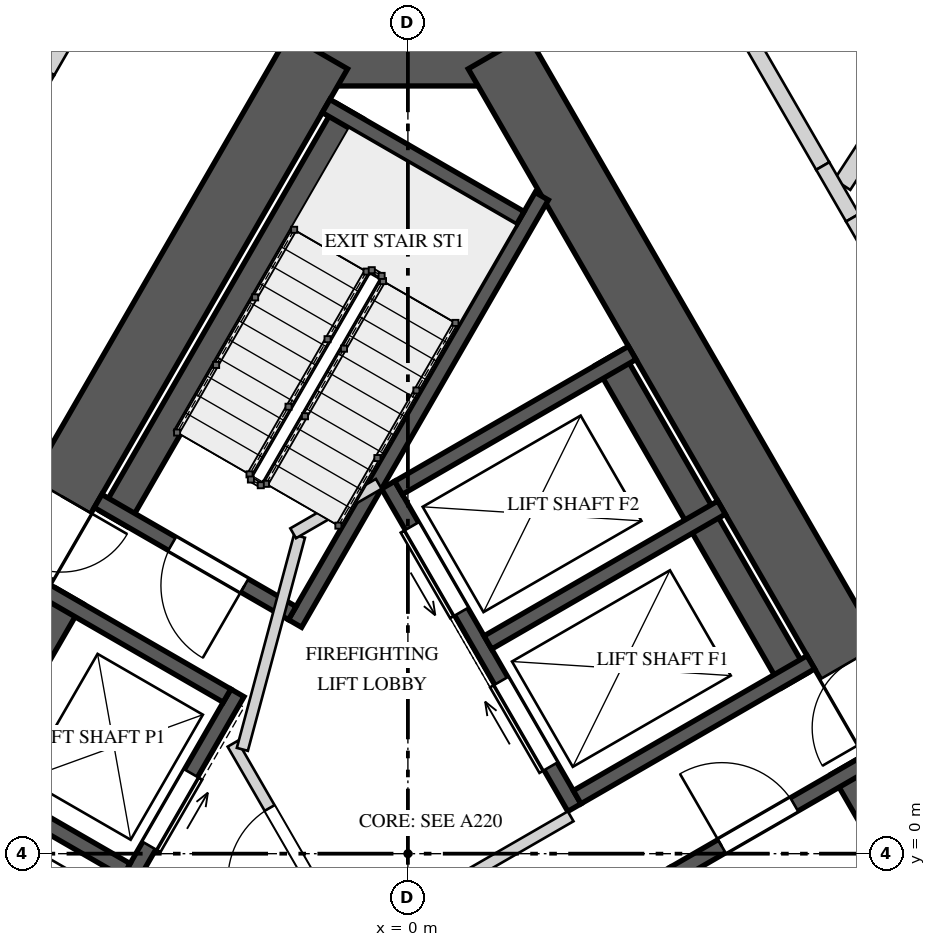
"""IFC4 building model, lengths in metres.
Left out: names, types, materials, properties, quantities, classifications, styles, units other than length and angle.
Written with IfcOpenShell. Run it as: python <this file> out.ifc"""

import sys

from ifc_helpers import new_model, si_unit, direction, frame, frame_2d, origin, place, context, subcontext, project, spatial, rectangle, extrude, element, fill, save


model = new_model("IFC4")
c1 = context("Model", 3, precision=1e-05, world=origin(), true_north=direction((0.0, 1.0)))
c2 = subcontext(c1, "Body", "Model", "MODEL_VIEW")
j1 = project(units=[si_unit("LENGTHUNIT", "METRE"), si_unit("PLANEANGLEUNIT", "RADIAN")], contexts=[c1])
p1 = place(None, origin())
s1 = spatial("IfcSite", under=j1, at=p1, CompositionType="ELEMENT")
p2 = place(p1, origin())
s2 = spatial("IfcBuilding", under=s1, at=p2, CompositionType="ELEMENT")
p3 = place(p2, frame((0.0, 0.0, 133.6)))
s3 = spatial("IfcBuildingStorey", under=s2, at=p3, CompositionType="ELEMENT", Elevation=133.6)
p4 = place(p3, frame((1.443, 10.55, 0.0), z_axis=(0.0, 0.0, 1.0), x_axis=(-1.0, 0.0, 0.0)))
e1 = element("IfcWall", 1, at=p4, inside=s3, PredefinedType="SHEAR", context=c2, shape_type="SweptSolid", body=[
    extrude(rectangle(XDim=2.887, YDim=0.9, at=frame_2d((1.443, 0.0))), origin(), (0.0, 0.0, 1.0), 4.0),
])
p5 = place(p3, frame((-1.184, 10.55, 0.0), z_axis=(0.0, 0.0, 1.0), x_axis=(-0.500004814304, -0.866022624227, 0.0)))
e2 = element("IfcWall", 2, at=p5, inside=s3, PredefinedType="SHEAR", context=c2, shape_type="SweptSolid", body=[
    extrude(rectangle(XDim=17.09, YDim=0.9, at=frame_2d((8.545, 0.0))), origin(), (0.0, 0.0, 1.0), 4.0),
])
p6 = place(p5, frame((6.75, 0.0, 0.0)))
e3 = element("IfcOpeningElement", 3, at=p6, cuts=e2, PredefinedType="OPENING", context=c2, shape_type="SweptSolid", body=[
    extrude(rectangle(XDim=1.0, YDim=2.4, at=frame_2d((0.5, 1.2))), frame((0.0, 0.46, 0.0), z_axis=(0.0, -1.0, 0.0), x_axis=(1.0, 0.0, 0.0)), (0.0, 0.0, 1.0), 0.92),
])
p7 = place(p5, frame((14.678, 0.0, 0.0)))
e4 = element("IfcOpeningElement", 4, at=p7, cuts=e2, PredefinedType="OPENING", context=c2, shape_type="SweptSolid", body=[
    extrude(rectangle(XDim=0.8, YDim=2.1, at=frame_2d((0.4, 1.05))), frame((0.0, 0.46, 0.0), z_axis=(0.0, -1.0, 0.0), x_axis=(1.0, 0.0, 0.0)), (0.0, 0.0, 1.0), 0.92),
])
p8 = place(p3, frame((9.729, -4.25, 0.0), z_axis=(0.0, 0.0, 1.0), x_axis=(-0.500004814304, 0.866022624227, 0.0)))
e5 = element("IfcWall", 5, at=p8, inside=s3, PredefinedType="SHEAR", context=c2, shape_type="SweptSolid", body=[
    extrude(rectangle(XDim=17.09, YDim=0.9, at=frame_2d((8.545, 0.0))), origin(), (0.0, 0.0, 1.0), 4.0),
])
p9 = place(p8, frame((6.82, 0.0, 0.0)))
e6 = element("IfcOpeningElement", 6, at=p9, cuts=e5, PredefinedType="OPENING", context=c2, shape_type="SweptSolid", body=[
    extrude(rectangle(XDim=1.0, YDim=2.4, at=frame_2d((0.5, 1.2))), frame((0.0, 0.46, 0.0), z_axis=(0.0, -1.0, 0.0), x_axis=(1.0, 0.0, 0.0)), (0.0, 0.0, 1.0), 0.92),
])
p10 = place(p3, frame((-0.766, 9.772, 0.0), z_axis=(0.0, 0.0, 1.0), x_axis=(-0.500009909098, -0.866019682689, 0.0)))
e7 = element("IfcWall", 7, at=p10, inside=s3, PredefinedType="SOLIDWALL", context=c2, shape_type="SweptSolid", body=[
    extrude(rectangle(XDim=6.2, YDim=0.4, at=frame_2d((3.1, 0.0))), origin(), (0.0, 0.0, 1.0), 3.65),
])
p11 = place(p3, frame((1.761, 8.65, 0.0), z_axis=(0.0, 0.0, 1.0), x_axis=(-0.500010023241, -0.866019616786, 0.0)))
e8 = element("IfcWall", 8, at=p11, inside=s3, PredefinedType="SOLIDWALL", context=c2, shape_type="SweptSolid", body=[
    extrude(rectangle(XDim=6.491, YDim=0.2, at=frame_2d((3.246, 0.0))), origin(), (0.0, 0.0, 1.0), 3.65),
])
p12 = place(p3, frame((1.479, 8.361, 0.0), z_axis=(0.0, 0.0, 1.0), x_axis=(-0.866003658127, 0.500037662692, 0.0)))
e9 = element("IfcWall", 9, at=p12, inside=s3, PredefinedType="SOLIDWALL", context=c2, shape_type="SweptSolid", body=[
    extrude(rectangle(XDim=2.95, YDim=0.2, at=frame_2d((1.475, 0.0))), origin(), (0.0, 0.0, 1.0), 3.65),
])
p13 = place(p3, frame((-1.521, 3.165, 0.0), z_axis=(0.0, 0.0, 1.0), x_axis=(-0.866039495442, 0.49997559174, 0.0)))
e10 = element("IfcWall", 10, at=p13, inside=s3, PredefinedType="SOLIDWALL", context=c2, shape_type="SweptSolid", body=[
    extrude(rectangle(XDim=2.95, YDim=0.2, at=frame_2d((1.475, 0.0))), origin(), (0.0, 0.0, 1.0), 3.65),
])
p14 = place(p13, frame((0.725, 0.0, 0.0)))
e11 = element("IfcOpeningElement", 11, at=p14, cuts=e10, PredefinedType="OPENING", context=c2, shape_type="SweptSolid", body=[
    extrude(rectangle(XDim=1.1, YDim=2.4, at=frame_2d((0.55, 1.2))), frame((0.0, 0.11, 0.0), z_axis=(0.0, -1.0, 0.0), x_axis=(1.0, 0.0, 0.0)), (0.0, 0.0, 1.0), 0.22),
])
p15 = place(p3, frame((8.846, -4.222, 0.0), z_axis=(0.0, 0.0, 1.0), x_axis=(-0.500009909098, 0.866019682689, 0.0)))
e12 = element("IfcWall", 12, at=p15, inside=s3, PredefinedType="SOLIDWALL", context=c2, shape_type="SweptSolid", body=[
    extrude(rectangle(XDim=6.2, YDim=0.4, at=frame_2d((3.1, 0.0))), origin(), (0.0, 0.0, 1.0), 3.65),
])
p16 = place(p3, frame((3.501, -0.265, 0.0), z_axis=(0.0, 0.0, 1.0), x_axis=(0.866039495442, 0.49997559174, 0.0)))
e13 = element("IfcWall", 13, at=p16, inside=s3, PredefinedType="SOLIDWALL", context=c2, shape_type="SweptSolid", body=[
    extrude(rectangle(XDim=2.95, YDim=0.2, at=frame_2d((1.475, 0.0))), origin(), (0.0, 0.0, 1.0), 3.65),
])
p17 = place(p16, frame((0.725, 0.0, 0.0)))
e14 = element("IfcOpeningElement", 14, at=p17, cuts=e13, PredefinedType="OPENING", context=c2, shape_type="SweptSolid", body=[
    extrude(rectangle(XDim=1.1, YDim=2.4, at=frame_2d((0.55, 1.2))), frame((0.0, 0.11, 0.0), z_axis=(0.0, -1.0, 0.0), x_axis=(1.0, 0.0, 0.0)), (0.0, 0.0, 1.0), 0.22),
])
p18 = place(p3, frame((-2.243, 2.115, 0.0), z_axis=(0.0, 0.0, 1.0), x_axis=(-0.499996545922, -0.866027397988, 0.0)))
e15 = element("IfcWall", 15, at=p18, inside=s3, PredefinedType="SOLIDWALL", context=c2, shape_type="SweptSolid", body=[
    extrude(rectangle(XDim=5.5, YDim=0.2, at=frame_2d((2.75, 0.0))), origin(), (0.0, 0.0, 1.0), 3.65),
])
p19 = place(p18, frame((1.22, 0.0, 0.0)))
e16 = element("IfcOpeningElement", 16, at=p19, cuts=e15, PredefinedType="OPENING", context=c2, shape_type="SweptSolid", body=[
    extrude(rectangle(XDim=1.1, YDim=2.1, at=frame_2d((0.55, 1.05))), frame((0.0, 0.11, 0.0), z_axis=(0.0, -1.0, 0.0), x_axis=(1.0, 0.0, 0.0)), (0.0, 0.0, 1.0), 0.22),
])
p20 = place(p18, frame((3.525, 0.0, 0.0)))
e17 = element("IfcOpeningElement", 17, at=p20, cuts=e15, PredefinedType="OPENING", context=c2, shape_type="SweptSolid", body=[
    extrude(rectangle(XDim=1.1, YDim=2.1, at=frame_2d((0.55, 1.05))), frame((0.0, 0.11, 0.0), z_axis=(0.0, -1.0, 0.0), x_axis=(1.0, 0.0, 0.0)), (0.0, 0.0, 1.0), 0.22),
])
p21 = place(p3, frame((-4.451, 3.39, 0.0), z_axis=(0.0, 0.0, 1.0), x_axis=(-0.499996545922, -0.866027397988, 0.0)))
e18 = element("IfcWall", 18, at=p21, inside=s3, PredefinedType="SOLIDWALL", context=c2, shape_type="SweptSolid", body=[
    extrude(rectangle(XDim=5.5, YDim=0.4, at=frame_2d((2.75, 0.0))), origin(), (0.0, 0.0, 1.0), 3.65),
])
for number, where, z_axis, x_axis in (
    (19, (-2.38, 2.078, 0.0), (0.0, 0.0, 1.0), (-0.866, 0.5, 0.0)),
    (20, (-3.705, -0.217, 0.0), (0.0, 0.0, 1.0), (-0.866, 0.5, 0.0)),
):
    element("IfcWall", number, at=place(p3, frame(where, z_axis=z_axis, x_axis=x_axis)), inside=s3, PredefinedType="SOLIDWALL", context=c2, shape_type="SweptSolid", body=[
        extrude(rectangle(XDim=2.75, YDim=0.2, at=frame_2d((1.375, 0.0))), origin(), (0.0, 0.0, 1.0), 3.65),
    ])
p22 = place(p3, frame((2.19, 0.606, 0.0), z_axis=(0.0, 0.0, 1.0), x_axis=(-0.500002801628, 0.866023786258, 0.0)))
e21 = element("IfcWall", 21, at=p22, inside=s3, PredefinedType="SOLIDWALL", context=c2, shape_type="SweptSolid", body=[
    extrude(rectangle(XDim=4.9, YDim=0.2, at=frame_2d((2.45, 0.0))), origin(), (0.0, 0.0, 1.0), 3.65),
])
p23 = place(p22, frame((0.625, 0.0, 0.0)))
e22 = element("IfcOpeningElement", 22, at=p23, cuts=e21, PredefinedType="OPENING", context=c2, shape_type="SweptSolid", body=[
    extrude(rectangle(XDim=1.3, YDim=2.1, at=frame_2d((0.65, 1.05))), frame((0.0, 0.11, 0.0), z_axis=(0.0, -1.0, 0.0), x_axis=(1.0, 0.0, 0.0)), (0.0, 0.0, 1.0), 0.22),
])
p24 = place(p22, frame((2.975, 0.0, 0.0)))
e23 = element("IfcOpeningElement", 23, at=p24, cuts=e21, PredefinedType="OPENING", context=c2, shape_type="SweptSolid", body=[
    extrude(rectangle(XDim=1.3, YDim=2.1, at=frame_2d((0.65, 1.05))), frame((0.0, 0.11, 0.0), z_axis=(0.0, -1.0, 0.0), x_axis=(1.0, 0.0, 0.0)), (0.0, 0.0, 1.0), 0.22),
])
p25 = place(p3, frame((5.092, 2.281, 0.0), z_axis=(0.0, 0.0, 1.0), x_axis=(-0.500018594424, 0.866014668023, 0.0)))
e24 = element("IfcWall", 24, at=p25, inside=s3, PredefinedType="SOLIDWALL", context=c2, shape_type="SweptSolid", body=[
    extrude(rectangle(XDim=4.9, YDim=0.4, at=frame_2d((2.45, 0.0))), origin(), (0.0, 0.0, 1.0), 3.65),
])
for number, where, z_axis, x_axis in (
    (25, (2.227, 0.743, 0.0), (0.0, 0.0, 1.0), (0.866, 0.5, 0.0)),
    (26, (1.052, 2.778, 0.0), (0.0, 0.0, 1.0), (0.866, 0.5, 0.0)),
):
    element("IfcWall", number, at=place(p3, frame(where, z_axis=z_axis, x_axis=x_axis)), inside=s3, PredefinedType="SOLIDWALL", context=c2, shape_type="SweptSolid", body=[
        extrude(rectangle(XDim=3.55, YDim=0.2, at=frame_2d((1.775, 0.0))), origin(), (0.0, 0.0, 1.0), 3.65),
    ])
p26 = place(p3, frame((-0.123, 4.813, 0.0), z_axis=(0.0, 0.0, 1.0), x_axis=(0.865995461329, 0.500051858269, 0.0)))
e27 = element("IfcWall", 27, at=p26, inside=s3, PredefinedType="SOLIDWALL", context=c2, shape_type="SweptSolid", body=[
    extrude(rectangle(XDim=3.55, YDim=0.2, at=frame_2d((1.775, 0.0))), origin(), (0.0, 0.0, 1.0), 3.65),
])
p27 = place(p3, frame((-0.744, -1.261, 0.0), z_axis=(0.0, 0.0, 1.0), x_axis=(-0.500004234368, 0.866022959057, 0.0)))
e28 = element("IfcWall", 28, at=p27, inside=s3, PredefinedType="PARTITIONING", context=c2, shape_type="SweptSolid", body=[
    extrude(rectangle(XDim=3.125, YDim=0.15, at=frame_2d((1.562, 0.0))), origin(), (0.0, 0.0, 1.0), 3.65),
])
p28 = place(p27, frame((1.05, 0.0, 0.0)))
e29 = element("IfcOpeningElement", 29, at=p28, cuts=e28, PredefinedType="OPENING", context=c2, shape_type="SweptSolid", body=[
    extrude(rectangle(XDim=1.1, YDim=2.4, at=frame_2d((0.55, 1.2))), frame((0.0, 0.085, 0.0), z_axis=(0.0, -1.0, 0.0), x_axis=(1.0, 0.0, 0.0)), (0.0, 0.0, 1.0), 0.17),
])
p29 = place(p3, frame((-0.717, -1.159, 0.0), z_axis=(0.0, 0.0, 1.0), x_axis=(0.866008176907, 0.50002983664, 0.0)))
e30 = element("IfcWall", 30, at=p29, inside=s3, PredefinedType="PARTITIONING", context=c2, shape_type="SweptSolid", body=[
    extrude(rectangle(XDim=3.3, YDim=0.15, at=frame_2d((1.65, 0.0))), origin(), (0.0, 0.0, 1.0), 3.65),
])
p30 = place(p3, frame((-2.178, 1.372, 0.0), z_axis=(0.0, 0.0, 1.0), x_axis=(0.258808958833, 0.96592852884, 0.0)))
e31 = element("IfcWall", 31, at=p30, inside=s3, PredefinedType="PARTITIONING", context=c2, shape_type="SweptSolid", body=[
    extrude(rectangle(XDim=2.903, YDim=0.15, at=frame_2d((1.451, 0.0))), origin(), (0.0, 0.0, 1.0), 3.65),
])
p31 = place(p3, frame((-1.51, 4.215, 0.0), z_axis=(0.0, 0.0, 1.0), x_axis=(0.866085525409, 0.49989585183, 0.0)))
e32 = element("IfcWall", 32, at=p31, inside=s3, PredefinedType="PARTITIONING", context=c2, shape_type="SweptSolid", body=[
    extrude(rectangle(XDim=1.3, YDim=0.15, at=frame_2d((0.65, 0.0))), origin(), (0.0, 0.0, 1.0), 3.65),
])
p32 = place(p3, frame((9.041, 13.922, 0.0), z_axis=(0.0, 0.0, 1.0), x_axis=(-0.544639775338, -0.838670087174, 0.0)))
e33 = element("IfcWall", 33, at=p32, inside=s3, PredefinedType="SOLIDWALL", context=c2, shape_type="SweptSolid", body=[
    extrude(rectangle(XDim=6.106, YDim=0.25, at=frame_2d((3.053, 0.0))), origin(), (0.0, 0.0, 1.0), 2.95),
])
p33 = place(p3, frame((2.887, 13.5, 0.0), z_axis=(0.0, 0.0, 1.0), x_axis=(0.50000466804, -0.866022708674, 0.0)))
e34 = element("IfcWall", 34, at=p33, inside=s3, PredefinedType="SOLIDWALL", context=c2, shape_type="SweptSolid", body=[
    extrude(rectangle(XDim=5.142, YDim=0.2, at=frame_2d((2.571, 0.0))), origin(), (0.0, 0.0, 1.0), 3.65),
])
p34 = place(p3, frame((5.458, 9.047, 0.0), z_axis=(0.0, 0.0, 1.0), x_axis=(0.499982474044, -0.866035522163, 0.0)))
e35 = element("IfcWall", 35, at=p34, inside=s3, PredefinedType="SOLIDWALL", context=c2, shape_type="SweptSolid", body=[
    extrude(rectangle(XDim=0.786, YDim=0.2, at=frame_2d((0.393, 0.0))), origin(), (0.0, 0.0, 1.0), 2.95),
])
p35 = place(p3, frame((5.851, 8.366, 0.0), z_axis=(0.0, 0.0, 1.0), x_axis=(0.499998034377, -0.866026538634, 0.0)))
e36 = element("IfcWall", 36, at=p35, inside=s3, PredefinedType="SOLIDWALL", context=c2, shape_type="SweptSolid", body=[
    extrude(rectangle(XDim=3.783, YDim=0.2, at=frame_2d((1.892, 0.0))), origin(), (0.0, 0.0, 1.0), 3.65),
])
p36 = place(p3, frame((-5.25, 9.407, 0.0), z_axis=(0.0, 0.0, 1.0), x_axis=(0.499991148707, 0.866030514021, 0.0)))
e37 = element("IfcWall", 37, at=p36, inside=s3, PredefinedType="SOLIDWALL", context=c2, shape_type="SweptSolid", body=[
    extrude(rectangle(XDim=1.022, YDim=0.2, at=frame_2d((0.511, 0.0))), origin(), (0.0, 0.0, 1.0), 3.65),
])
p37 = place(p3, frame((-4.738, 10.293, 0.0), z_axis=(0.0, 0.0, 1.0), x_axis=(0.500001688065, 0.866024429177, 0.0)))
e38 = element("IfcWall", 38, at=p37, inside=s3, PredefinedType="SOLIDWALL", context=c2, shape_type="SweptSolid", body=[
    extrude(rectangle(XDim=1.135, YDim=0.2, at=frame_2d((0.568, 0.0))), origin(), (0.0, 0.0, 1.0), 2.55),
])
p38 = place(p14, origin())
e39 = element("IfcDoor", 39, at=p38, inside=s3, OperationType="SINGLE_SWING_RIGHT", PredefinedType="DOOR", context=c2, shape_type="SweptSolid", body=[
    extrude(rectangle(XDim=1.1, YDim=2.4, at=frame_2d((0.55, 1.2))), frame((0.0, 0.025, 0.0), z_axis=(0.0, -1.0, 0.0), x_axis=(1.0, 0.0, 0.0)), (0.0, 0.0, 1.0), 0.05),
])
fill(e11, e39)
p39 = place(p17, origin())
e40 = element("IfcDoor", 40, at=p39, inside=s3, OperationType="SINGLE_SWING_RIGHT", PredefinedType="DOOR", context=c2, shape_type="SweptSolid", body=[
    extrude(rectangle(XDim=1.1, YDim=2.4, at=frame_2d((0.55, 1.2))), frame((0.0, 0.025, 0.0), z_axis=(0.0, -1.0, 0.0), x_axis=(1.0, 0.0, 0.0)), (0.0, 0.0, 1.0), 0.05),
])
fill(e14, e40)
p40 = place(p19, origin())
e41 = element("IfcDoor", 41, at=p40, inside=s3, OperationType="SLIDING_TO_LEFT", PredefinedType="DOOR", context=c2, shape_type="SweptSolid", body=[
    extrude(rectangle(XDim=1.1, YDim=2.1, at=frame_2d((0.55, 1.05))), frame((0.0, 0.025, 0.0), z_axis=(0.0, -1.0, 0.0), x_axis=(1.0, 0.0, 0.0)), (0.0, 0.0, 1.0), 0.05),
])
fill(e16, e41)
p41 = place(p23, origin())
e42 = element("IfcDoor", 42, at=p41, inside=s3, OperationType="SLIDING_TO_RIGHT", PredefinedType="DOOR", context=c2, shape_type="SweptSolid", body=[
    extrude(rectangle(XDim=1.3, YDim=2.1, at=frame_2d((0.65, 1.05))), frame((0.0, 0.025, 0.0), z_axis=(0.0, -1.0, 0.0), x_axis=(1.0, 0.0, 0.0)), (0.0, 0.0, 1.0), 0.05),
])
fill(e22, e42)
p42 = place(p24, origin())
e43 = element("IfcDoor", 43, at=p42, inside=s3, OperationType="SLIDING_TO_LEFT", PredefinedType="DOOR", context=c2, shape_type="SweptSolid", body=[
    extrude(rectangle(XDim=1.3, YDim=2.1, at=frame_2d((0.65, 1.05))), frame((0.0, 0.025, 0.0), z_axis=(0.0, -1.0, 0.0), x_axis=(1.0, 0.0, 0.0)), (0.0, 0.0, 1.0), 0.05),
])
fill(e23, e43)
p43 = place(p28, origin())
e44 = element("IfcDoor", 44, at=p43, inside=s3, OperationType="SINGLE_SWING_RIGHT", PredefinedType="DOOR", context=c2, shape_type="SweptSolid", body=[
    extrude(rectangle(XDim=1.1, YDim=2.4, at=frame_2d((0.55, 1.2))), frame((0.0, 0.025, 0.0), z_axis=(0.0, -1.0, 0.0), x_axis=(1.0, 0.0, 0.0)), (0.0, 0.0, 1.0), 0.05),
])
fill(e29, e44)
p44 = place(p6, origin())
e45 = element("IfcDoor", 45, at=p44, inside=s3, OperationType="SINGLE_SWING_LEFT", PredefinedType="DOOR", context=c2, shape_type="SweptSolid", body=[
    extrude(rectangle(XDim=1.0, YDim=2.4, at=frame_2d((0.5, 1.2))), frame((0.0, 0.025, 0.0), z_axis=(0.0, -1.0, 0.0), x_axis=(1.0, 0.0, 0.0)), (0.0, 0.0, 1.0), 0.05),
])
fill(e3, e45)
p45 = place(p9, origin())
e46 = element("IfcDoor", 46, at=p45, inside=s3, OperationType="SINGLE_SWING_LEFT", PredefinedType="DOOR", context=c2, shape_type="SweptSolid", body=[
    extrude(rectangle(XDim=1.0, YDim=2.4, at=frame_2d((0.5, 1.2))), frame((0.0, 0.025, 0.0), z_axis=(0.0, -1.0, 0.0), x_axis=(1.0, 0.0, 0.0)), (0.0, 0.0, 1.0), 0.05),
])
fill(e6, e46)
save(model, sys.argv[1])
